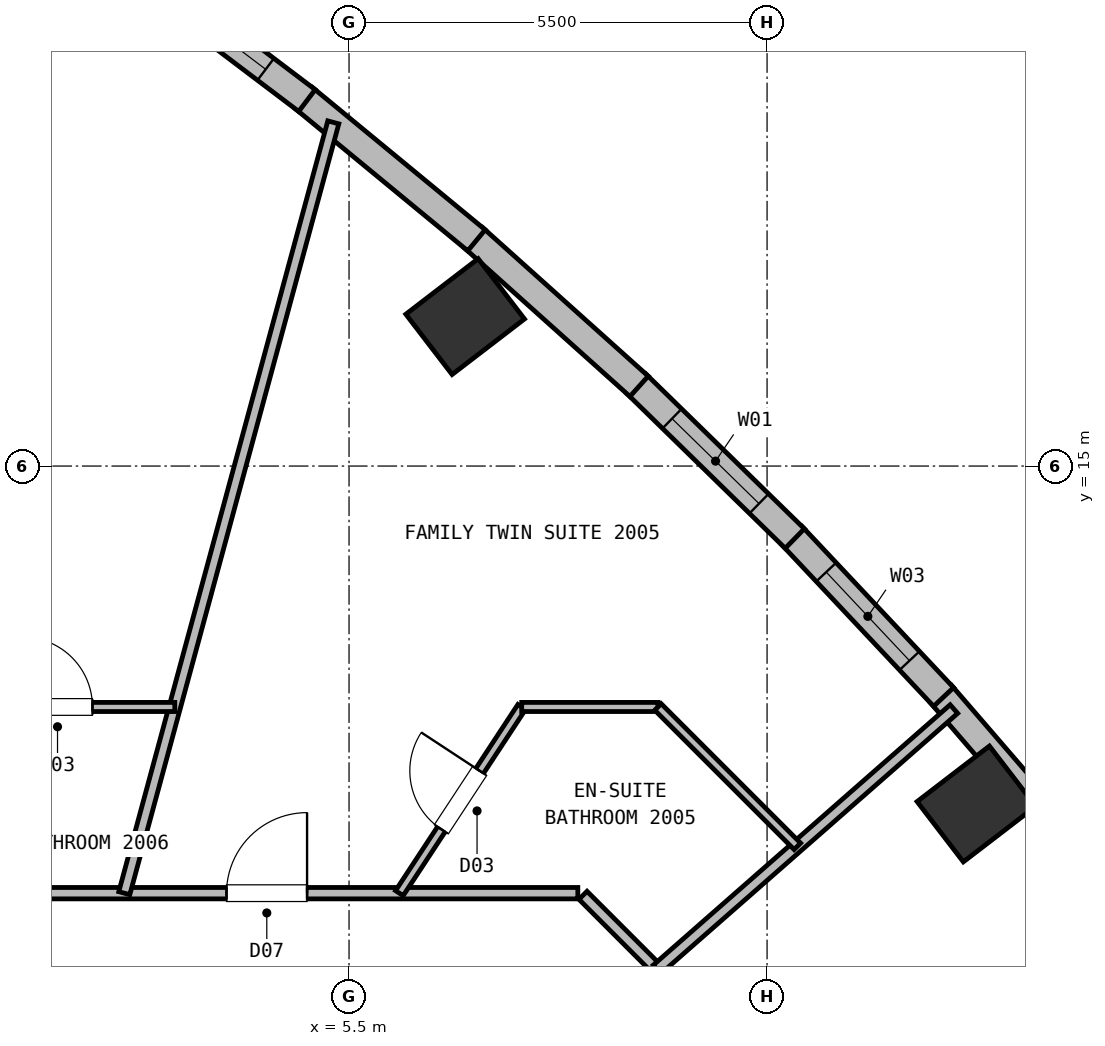
"""IFC4 building model, lengths in metres.
Left out: names, types, materials, properties, quantities, classifications, styles, units other than length and angle.
Written with IfcOpenShell. Run it as: python <this file> out.ifc"""

import sys

from ifc_helpers import new_model, si_unit, direction, frame, frame_2d, origin, origin_2d, place, context, subcontext, project, spatial, rectangle, extrude, element, fill, save


model = new_model("IFC4")
c1 = context("Model", 3, precision=1e-05, world=origin(), true_north=direction((0.0, 1.0)))
c2 = subcontext(c1, "Body", "Model", "MODEL_VIEW")
j1 = project(units=[si_unit("LENGTHUNIT", "METRE"), si_unit("PLANEANGLEUNIT", "RADIAN")], contexts=[c1])
p1 = place(None, origin())
s1 = spatial("IfcSite", under=j1, at=p1, CompositionType="ELEMENT")
p2 = place(p1, origin())
s2 = spatial("IfcBuilding", under=s1, at=p2, CompositionType="ELEMENT")
p3 = place(p2, frame((0.0, 0.0, 71.75)))
s3 = spatial("IfcBuildingStorey", under=s2, at=p3, CompositionType="ELEMENT", Elevation=71.75)
for number, where, z_axis, x_axis in (
    (1, (13.754, 10.554, 0.0), (0.0, 0.0, 1.0), (-0.609, 0.793, 0.0)),
    (2, (7.028, 16.966, 0.0), (0.0, 0.0, 1.0), (-0.609, 0.793, 0.0)),
):
    element("IfcColumn", number, at=place(p3, frame(where, z_axis=z_axis, x_axis=x_axis)), inside=s3, PredefinedType="COLUMN", context=c2, shape_type="SweptSolid", body=[
        extrude(rectangle(XDim=1.0, YDim=1.2, at=origin_2d()), origin(), (0.0, 0.0, 1.0), 3.75),
    ])
p4 = place(p3, frame((13.289, 11.999, 0.0), z_axis=(0.0, 0.0, 1.0), x_axis=(0.653123840967, -0.757251113146, 0.0)))
e3 = element("IfcWall", 3, at=p4, inside=s3, PredefinedType="SOLIDWALL", context=c2, shape_type="SweptSolid", body=[
    extrude(rectangle(XDim=2.91, YDim=0.36, at=frame_2d((1.455, 0.0))), origin(), (0.0, 0.0, 1.0), 3.5),
])
p5 = place(p3, frame((11.33, 14.082, 0.0), z_axis=(0.0, 0.0, 1.0), x_axis=(0.684867242206, -0.728667867106, 0.0)))
e4 = element("IfcWall", 4, at=p5, inside=s3, PredefinedType="SOLIDWALL", context=c2, shape_type="SweptSolid", body=[
    extrude(rectangle(XDim=2.91, YDim=0.36, at=frame_2d((1.455, 0.0))), origin(), (0.0, 0.0, 1.0), 3.5),
])
p6 = place(p5, frame((0.655, 0.0, 0.72)))
e5 = element("IfcOpeningElement", 5, at=p6, cuts=e4, PredefinedType="OPENING", context=c2, shape_type="SweptSolid", body=[
    extrude(rectangle(XDim=1.6, YDim=1.88, at=frame_2d((0.8, 0.94))), frame((0.0, 0.19, 0.0), z_axis=(0.0, -1.0, 0.0), x_axis=(1.0, 0.0, 0.0)), (0.0, 0.0, 1.0), 0.38),
])
p7 = place(p3, frame((9.28, 16.083, 0.0), z_axis=(0.0, 0.0, 1.0), x_axis=(0.715308991841, -0.698808304324, 0.0)))
e6 = element("IfcWall", 6, at=p7, inside=s3, PredefinedType="SOLIDWALL", context=c2, shape_type="SweptSolid", body=[
    extrude(rectangle(XDim=2.915, YDim=0.36, at=frame_2d((1.458, 0.0))), origin(), (0.0, 0.0, 1.0), 3.5),
])
p8 = place(p7, frame((0.657, 0.0, 0.72)))
e7 = element("IfcOpeningElement", 7, at=p8, cuts=e6, PredefinedType="OPENING", context=c2, shape_type="SweptSolid", body=[
    extrude(rectangle(XDim=1.6, YDim=1.88, at=frame_2d((0.8, 0.94))), frame((0.0, 0.19, 0.0), z_axis=(0.0, -1.0, 0.0), x_axis=(1.0, 0.0, 0.0)), (0.0, 0.0, 1.0), 0.38),
])
p9 = place(p3, frame((7.139, 18.003, 0.0), z_axis=(0.0, 0.0, 1.0), x_axis=(0.744297597045, -0.667848101767, 0.0)))
e8 = element("IfcWall", 8, at=p9, inside=s3, PredefinedType="SOLIDWALL", context=c2, shape_type="SweptSolid", body=[
    extrude(rectangle(XDim=2.925, YDim=0.36, at=frame_2d((1.463, 0.0))), origin(), (0.0, 0.0, 1.0), 3.5),
])
p10 = place(p3, frame((4.907, 19.84, 0.0), z_axis=(0.0, 0.0, 1.0), x_axis=(0.771748074842, -0.635928383529, 0.0)))
e9 = element("IfcWall", 9, at=p10, inside=s3, PredefinedType="SOLIDWALL", context=c2, shape_type="SweptSolid", body=[
    extrude(rectangle(XDim=2.941, YDim=0.36, at=frame_2d((1.47, 0.0))), origin(), (0.0, 0.0, 1.0), 3.5),
])
p11 = place(p3, frame((2.585, 21.596, 0.0), z_axis=(0.0, 0.0, 1.0), x_axis=(0.797450341729, -0.603384580907, 0.0)))
e10 = element("IfcWall", 10, at=p11, inside=s3, PredefinedType="SOLIDWALL", context=c2, shape_type="SweptSolid", body=[
    extrude(rectangle(XDim=2.961, YDim=0.36, at=frame_2d((1.481, 0.0))), origin(), (0.0, 0.0, 1.0), 3.5),
])
p12 = place(p11, frame((0.681, 0.0, 0.72)))
e11 = element("IfcOpeningElement", 11, at=p12, cuts=e10, PredefinedType="OPENING", context=c2, shape_type="SweptSolid", body=[
    extrude(rectangle(XDim=1.6, YDim=1.88, at=frame_2d((0.8, 0.94))), frame((0.0, 0.19, 0.0), z_axis=(0.0, -1.0, 0.0), x_axis=(1.0, 0.0, 0.0)), (0.0, 0.0, 1.0), 0.38),
])
p13 = place(p3, frame((8.578, 9.352, 0.0), z_axis=(0.0, 0.0, 1.0), x_axis=(0.707067066127, -0.707146494016, 0.0)))
e12 = element("IfcWall", 12, at=p13, inside=s3, PredefinedType="PARTITIONING", context=c2, shape_type="SweptSolid", body=[
    extrude(rectangle(XDim=3.074, YDim=0.15, at=frame_2d((1.537, 0.0))), origin(), (0.0, 0.0, 1.0), 3.5),
])
p14 = place(p3, frame((-8.51, 9.38, 0.0), z_axis=(0.0, 0.0, 1.0), x_axis=(1.0, 0.0, 0.0)))
e13 = element("IfcWall", 13, at=p14, inside=s3, PredefinedType="PARTITIONING", context=c2, shape_type="SweptSolid", body=[
    extrude(rectangle(XDim=17.02, YDim=0.15, at=frame_2d((8.51, 0.0))), origin(), (0.0, 0.0, 1.0), 3.5),
])
p15 = place(p14, frame((12.398, 0.0, 0.0)))
e14 = element("IfcOpeningElement", 14, at=p15, cuts=e13, PredefinedType="OPENING", context=c2, shape_type="SweptSolid", body=[
    extrude(rectangle(XDim=1.06, YDim=2.15, at=frame_2d((0.53, 1.075))), frame((0.0, 0.085, 0.0), z_axis=(0.0, -1.0, 0.0), x_axis=(1.0, 0.0, 0.0)), (0.0, 0.0, 1.0), 0.17),
])
p16 = place(p14, frame((1.007, 0.0, 0.0)))
e15 = element("IfcOpeningElement", 15, at=p16, cuts=e13, PredefinedType="OPENING", context=c2, shape_type="SweptSolid", body=[
    extrude(rectangle(XDim=1.06, YDim=2.15, at=frame_2d((0.53, 1.075))), frame((0.0, 0.085, 0.0), z_axis=(0.0, -1.0, 0.0), x_axis=(1.0, 0.0, 0.0)), (0.0, 0.0, 1.0), 0.17),
])
p17 = place(p14, frame((6.683, 0.0, 0.0)))
e16 = element("IfcOpeningElement", 16, at=p17, cuts=e13, PredefinedType="OPENING", context=c2, shape_type="SweptSolid", body=[
    extrude(rectangle(XDim=1.06, YDim=2.15, at=frame_2d((0.53, 1.075))), frame((0.0, 0.085, 0.0), z_axis=(0.0, -1.0, 0.0), x_axis=(1.0, 0.0, 0.0)), (0.0, 0.0, 1.0), 0.17),
])
p18 = place(p3, frame((9.552, 8.377, 0.0), z_axis=(0.0, 0.0, 1.0), x_axis=(0.751836766188, 0.659349283012, 0.0)))
e17 = element("IfcWall", 17, at=p18, inside=s3, PredefinedType="PARTITIONING", context=c2, shape_type="SweptSolid", body=[
    extrude(rectangle(XDim=5.195, YDim=0.15, at=frame_2d((2.598, 0.0))), origin(), (0.0, 0.0, 1.0), 3.5),
])
p19 = place(p3, frame((6.162, 9.38, 0.0), z_axis=(0.0, 0.0, 1.0), x_axis=(0.54905657123, 0.835785188664, 0.0)))
e18 = element("IfcWall", 18, at=p19, inside=s3, PredefinedType="PARTITIONING", context=c2, shape_type="SweptSolid", body=[
    extrude(rectangle(XDim=2.932, YDim=0.12, at=frame_2d((1.466, 0.0))), origin(), (0.0, 0.0, 1.0), 3.5),
])
p20 = place(p19, frame((1.006, 0.0, 0.0)))
e19 = element("IfcOpeningElement", 19, at=p20, cuts=e18, PredefinedType="OPENING", context=c2, shape_type="SweptSolid", body=[
    extrude(rectangle(XDim=0.92, YDim=2.1, at=frame_2d((0.46, 1.05))), frame((0.0, 0.07, 0.0), z_axis=(0.0, -1.0, 0.0), x_axis=(1.0, 0.0, 0.0)), (0.0, 0.0, 1.0), 0.14),
])
p21 = place(p3, frame((7.772, 11.83, 0.0), z_axis=(0.0, 0.0, 1.0), x_axis=(1.0, 0.0, 0.0)))
e20 = element("IfcWall", 20, at=p21, inside=s3, PredefinedType="PARTITIONING", context=c2, shape_type="SweptSolid", body=[
    extrude(rectangle(XDim=1.793, YDim=0.12, at=frame_2d((0.896, 0.0))), origin(), (0.0, 0.0, 1.0), 3.5),
])
p22 = place(p3, frame((11.398, 9.996, 0.0), z_axis=(0.0, 0.0, 1.0), x_axis=(-0.707106781187, 0.707106781187, 0.0)))
e21 = element("IfcWall", 21, at=p22, inside=s3, PredefinedType="PARTITIONING", context=c2, shape_type="SweptSolid", body=[
    extrude(rectangle(XDim=2.593, YDim=0.12, at=frame_2d((1.297, 0.0))), origin(), (0.0, 0.0, 1.0), 3.5),
])
p23 = place(p3, frame((2.543, 9.38, 0.0), z_axis=(0.0, 0.0, 1.0), x_axis=(0.26169188867, 0.965151467597, 0.0)))
e22 = element("IfcWall", 22, at=p23, inside=s3, PredefinedType="PARTITIONING", context=c2, shape_type="SweptSolid", body=[
    extrude(rectangle(XDim=10.509, YDim=0.15, at=frame_2d((5.254, 0.0))), origin(), (0.0, 0.0, 1.0), 3.5),
])
p24 = place(p3, frame((0.122, 11.83, 0.0), z_axis=(0.0, 0.0, 1.0), x_axis=(1.0, 0.0, 0.0)))
e23 = element("IfcWall", 23, at=p24, inside=s3, PredefinedType="PARTITIONING", context=c2, shape_type="SweptSolid", body=[
    extrude(rectangle(XDim=3.086, YDim=0.12, at=frame_2d((1.543, 0.0))), origin(), (0.0, 0.0, 1.0), 3.5),
])
p25 = place(p24, frame((1.083, 0.0, 0.0)))
e24 = element("IfcOpeningElement", 24, at=p25, cuts=e23, PredefinedType="OPENING", context=c2, shape_type="SweptSolid", body=[
    extrude(rectangle(XDim=0.92, YDim=2.1, at=frame_2d((0.46, 1.05))), frame((0.0, 0.07, 0.0), z_axis=(0.0, -1.0, 0.0), x_axis=(1.0, 0.0, 0.0)), (0.0, 0.0, 1.0), 0.14),
])
p26 = place(p6, origin())
e25 = element("IfcWindow", 25, at=p26, inside=s3, PartitioningType="SINGLE_PANEL", PredefinedType="WINDOW", context=c2, shape_type="SweptSolid", body=[
    extrude(rectangle(XDim=1.6, YDim=1.88, at=frame_2d((0.8, 0.94))), frame((0.0, 0.03, 0.0), z_axis=(0.0, -1.0, 0.0), x_axis=(1.0, 0.0, 0.0)), (0.0, 0.0, 1.0), 0.06),
])
fill(e5, e25)
p27 = place(p8, origin())
e26 = element("IfcWindow", 26, at=p27, inside=s3, PartitioningType="SINGLE_PANEL", PredefinedType="WINDOW", context=c2, shape_type="SweptSolid", body=[
    extrude(rectangle(XDim=1.6, YDim=1.88, at=frame_2d((0.8, 0.94))), frame((0.0, 0.03, 0.0), z_axis=(0.0, -1.0, 0.0), x_axis=(1.0, 0.0, 0.0)), (0.0, 0.0, 1.0), 0.06),
])
fill(e7, e26)
p28 = place(p12, origin())
e27 = element("IfcWindow", 27, at=p28, inside=s3, PartitioningType="SINGLE_PANEL", PredefinedType="WINDOW", context=c2, shape_type="SweptSolid", body=[
    extrude(rectangle(XDim=1.6, YDim=1.88, at=frame_2d((0.8, 0.94))), frame((0.0, 0.03, 0.0), z_axis=(0.0, -1.0, 0.0), x_axis=(1.0, 0.0, 0.0)), (0.0, 0.0, 1.0), 0.06),
])
fill(e11, e27)
p29 = place(p20, origin())
e28 = element("IfcDoor", 28, at=p29, inside=s3, OperationType="SINGLE_SWING_RIGHT", PredefinedType="DOOR", context=c2, shape_type="SweptSolid", body=[
    extrude(rectangle(XDim=0.92, YDim=2.1, at=frame_2d((0.46, 1.05))), frame((0.0, 0.025, 0.0), z_axis=(0.0, -1.0, 0.0), x_axis=(1.0, 0.0, 0.0)), (0.0, 0.0, 1.0), 0.05),
])
fill(e19, e28)
p30 = place(p25, origin())
e29 = element("IfcDoor", 29, at=p30, inside=s3, OperationType="SINGLE_SWING_LEFT", PredefinedType="DOOR", context=c2, shape_type="SweptSolid", body=[
    extrude(rectangle(XDim=0.92, YDim=2.1, at=frame_2d((0.46, 1.05))), frame((0.0, 0.025, 0.0), z_axis=(0.0, -1.0, 0.0), x_axis=(1.0, 0.0, 0.0)), (0.0, 0.0, 1.0), 0.05),
])
fill(e24, e29)
p31 = place(p15, origin())
e30 = element("IfcDoor", 30, at=p31, inside=s3, OperationType="SINGLE_SWING_RIGHT", PredefinedType="DOOR", context=c2, shape_type="SweptSolid", body=[
    extrude(rectangle(XDim=1.06, YDim=2.15, at=frame_2d((0.53, 1.075))), frame((0.0, 0.025, 0.0), z_axis=(0.0, -1.0, 0.0), x_axis=(1.0, 0.0, 0.0)), (0.0, 0.0, 1.0), 0.05),
])
fill(e14, e30)
save(model, sys.argv[1])
